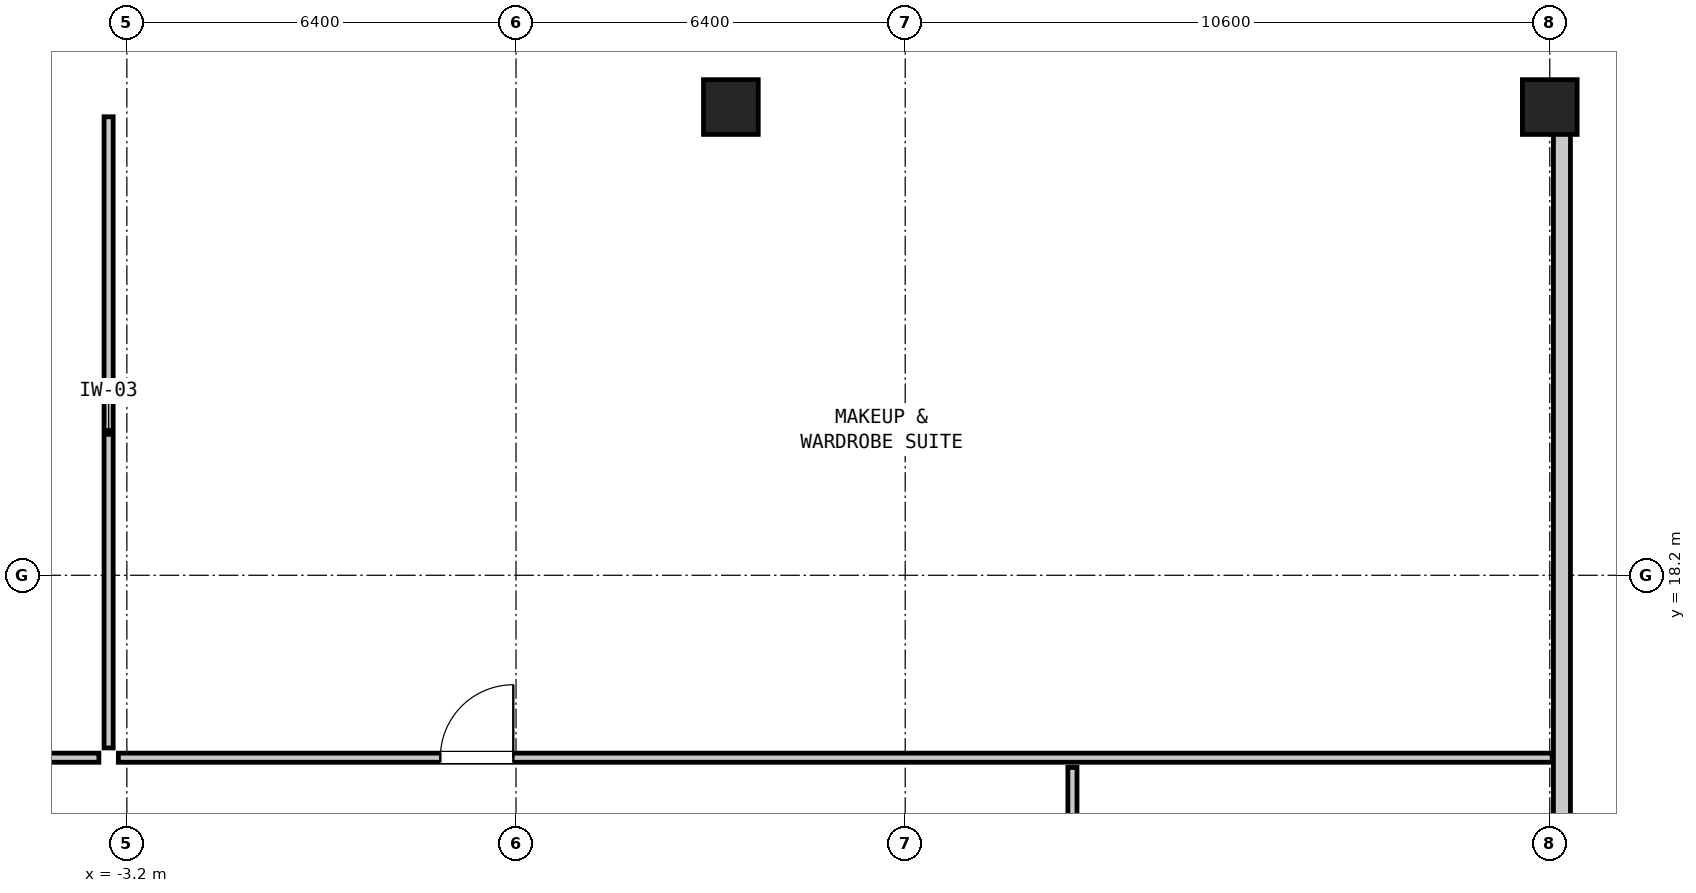
"""IFC4 building model, lengths in metres.
Left out: names, types, materials, properties, quantities, classifications, styles, units other than length and angle.
Written with IfcOpenShell. Run it as: python <this file> out.ifc"""

import sys

from ifc_helpers import new_model, si_unit, direction, frame, frame_2d, origin, origin_2d, place, context, subcontext, project, spatial, rectangle, hollow_rectangle, extrude, element, fill, save


model = new_model("IFC4")
c1 = context("Model", 3, precision=1e-05, world=origin(), true_north=direction((0.0, 1.0)))
c2 = subcontext(c1, "Body", "Model", "MODEL_VIEW")
j1 = project(units=[si_unit("LENGTHUNIT", "METRE"), si_unit("PLANEANGLEUNIT", "RADIAN")], contexts=[c1])
p1 = place(None, origin())
s1 = spatial("IfcSite", under=j1, at=p1, CompositionType="ELEMENT")
p2 = place(p1, origin())
s2 = spatial("IfcBuilding", under=s1, at=p2, CompositionType="ELEMENT")
p3 = place(p2, frame((0.0, 0.0, 5.1)))
s3 = spatial("IfcBuildingStorey", under=s2, at=p3, CompositionType="ELEMENT", Elevation=5.1)
for number, where, z_axis, x_axis in (
    (1, (20.2, 25.9, 0.0), (0.0, 0.0, 1.0), (1.0, 0.0, 0.0)),
    (2, (6.733, 25.9, 0.0), (0.0, 0.0, 1.0), (1.0, 0.0, 0.0)),
):
    element("IfcColumn", number, at=place(p3, frame(where, z_axis=z_axis, x_axis=x_axis)), inside=s3, PredefinedType="COLUMN", context=c2, shape_type="SweptSolid", body=[
        extrude(hollow_rectangle(XDim=0.9, YDim=0.9, WallThickness=0.055, at=origin_2d()), origin(), (0.0, 0.0, 1.0), 4.2),
    ])
p4 = place(p3, frame((20.4, -25.74, 0.0), z_axis=(0.0, 0.0, 1.0), x_axis=(0.0, 1.0, 0.0)))
e3 = element("IfcWall", 3, at=p4, inside=s3, PredefinedType="MOVABLE", context=c2, shape_type="SweptSolid", body=[
    extrude(rectangle(XDim=51.48, YDim=0.28, at=frame_2d((25.74, 0.0))), origin(), (0.0, 0.0, 1.0), 2.933),
])
p5 = place(p4, frame((25.255, 0.0, 0.0)))
e4 = element("IfcOpeningElement", 4, at=p5, cuts=e3, PredefinedType="OPENING", context=c2, shape_type="SweptSolid", body=[
    extrude(rectangle(XDim=2.0, YDim=2.14, at=frame_2d((1.0, 1.07))), frame((0.0, 0.152, 0.0), z_axis=(0.0, -1.0, 0.0), x_axis=(1.0, 0.0, 0.0)), (0.0, 0.0, 1.0), 0.304),
])
p6 = place(p3, frame((-28.24, 15.2, 0.0), z_axis=(0.0, 0.0, 1.0), x_axis=(1.0, 0.0, 0.0)))
e5 = element("IfcWall", 5, at=p6, inside=s3, PredefinedType="PARTITIONING", context=c2, shape_type="SweptSolid", body=[
    extrude(rectangle(XDim=24.58, YDim=0.15, at=frame_2d((12.29, 0.0))), origin(), (0.0, 0.0, 1.0), 3.88),
])
p7 = place(p6, frame((18.572, 0.0, 0.0)))
e6 = element("IfcOpeningElement", 6, at=p7, cuts=e5, PredefinedType="OPENING", context=c2, shape_type="SweptSolid", body=[
    extrude(rectangle(XDim=1.2, YDim=2.1, at=frame_2d((0.6, 1.05))), frame((0.0, 0.087, 0.0), z_axis=(0.0, -1.0, 0.0), x_axis=(1.0, 0.0, 0.0)), (0.0, 0.0, 1.0), 0.174),
])
p8 = place(p3, frame((-3.34, 15.2, 0.0), z_axis=(0.0, 0.0, 1.0), x_axis=(1.0, 0.0, 0.0)))
e7 = element("IfcWall", 7, at=p8, inside=s3, PredefinedType="PARTITIONING", context=c2, shape_type="SweptSolid", body=[
    extrude(rectangle(XDim=23.58, YDim=0.15, at=frame_2d((11.79, 0.0))), origin(), (0.0, 0.0, 1.0), 3.88),
])
p9 = place(p8, frame((5.295, 0.0, 0.0)))
e8 = element("IfcOpeningElement", 8, at=p9, cuts=e7, PredefinedType="OPENING", context=c2, shape_type="SweptSolid", body=[
    extrude(rectangle(XDim=1.2, YDim=2.1, at=frame_2d((0.6, 1.05))), frame((0.0, 0.087, 0.0), z_axis=(0.0, -1.0, 0.0), x_axis=(1.0, 0.0, 0.0)), (0.0, 0.0, 1.0), 0.174),
])
p10 = place(p3, frame((-3.5, 15.36, 0.0), z_axis=(0.0, 0.0, 1.0), x_axis=(0.0, 1.0, 0.0)))
e9 = element("IfcWall", 9, at=p10, inside=s3, PredefinedType="PARTITIONING", context=c2, shape_type="SweptSolid", body=[
    extrude(rectangle(XDim=10.38, YDim=0.15, at=frame_2d((5.19, 0.0))), origin(), (0.0, 0.0, 1.0), 3.88),
])
p11 = place(p3, frame((12.35, 3.74, 0.0), z_axis=(0.0, 0.0, 1.0), x_axis=(0.0, 1.0, 0.0)))
e10 = element("IfcWall", 10, at=p11, inside=s3, PredefinedType="PARTITIONING", context=c2, shape_type="SweptSolid", body=[
    extrude(rectangle(XDim=11.3, YDim=0.15, at=frame_2d((5.65, 0.0))), origin(), (0.0, 0.0, 1.0), 3.88),
])
p12 = place(p11, frame((5.175, 0.0, 0.0)))
e11 = element("IfcOpeningElement", 11, at=p12, cuts=e10, PredefinedType="OPENING", context=c2, shape_type="SweptSolid", body=[
    extrude(rectangle(XDim=0.95, YDim=2.1, at=frame_2d((0.475, 1.05))), frame((0.0, 0.087, 0.0), z_axis=(0.0, -1.0, 0.0), x_axis=(1.0, 0.0, 0.0)), (0.0, 0.0, 1.0), 0.174),
])
p13 = place(p9, origin())
e12 = element("IfcDoor", 12, at=p13, inside=s3, OperationType="SINGLE_SWING_RIGHT", PredefinedType="DOOR", context=c2, shape_type="SweptSolid", body=[
    extrude(rectangle(XDim=1.2, YDim=2.1, at=frame_2d((0.6, 1.05))), frame((0.0, 0.025, 0.0), z_axis=(0.0, -1.0, 0.0), x_axis=(1.0, 0.0, 0.0)), (0.0, 0.0, 1.0), 0.05),
])
fill(e8, e12)
save(model, sys.argv[1])
